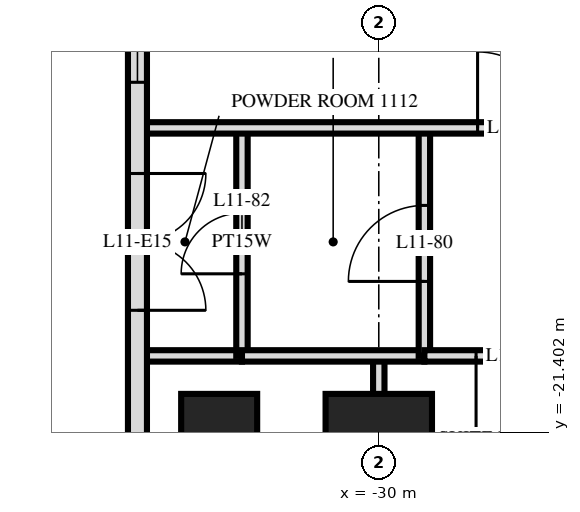
"""IFC4 building model, lengths in metres.
Left out: names, types, materials, properties, quantities, classifications, styles, units other than length and angle.
Written with IfcOpenShell. Run it as: python <this file> out.ifc"""

import sys

from ifc_helpers import new_model, si_unit, direction, frame, frame_2d, origin, origin_2d, place, context, subcontext, project, spatial, rectangle, extrude, element, fill, save


model = new_model("IFC4")
c1 = context("Model", 3, precision=1e-05, world=origin(), true_north=direction((0.0, 1.0)))
c2 = subcontext(c1, "Body", "Model", "MODEL_VIEW")
j1 = project(units=[si_unit("LENGTHUNIT", "METRE"), si_unit("PLANEANGLEUNIT", "RADIAN")], contexts=[c1])
p1 = place(None, origin())
s1 = spatial("IfcSite", under=j1, at=p1, CompositionType="ELEMENT")
p2 = place(p1, origin())
s2 = spatial("IfcBuilding", under=s1, at=p2, CompositionType="ELEMENT")
p3 = place(p2, frame((0.0, 0.0, 49.2)))
s3 = spatial("IfcBuildingStorey", under=s2, at=p3, CompositionType="ELEMENT", Elevation=49.2)
p4 = place(p3, frame((-32.1, -21.6, 0.0), z_axis=(0.0, 0.0, 1.0), x_axis=(0.0, 1.0, 0.0)))
e1 = element("IfcColumn", 1, at=p4, inside=s3, PredefinedType="COLUMN", context=c2, shape_type="SweptSolid", body=[
    extrude(rectangle(XDim=1.4, YDim=1.0, at=origin_2d()), origin(), (0.0, 0.0, 1.0), 3.6),
])
p5 = place(p3, frame((-30.0, -21.6, 0.0), z_axis=(0.0, 0.0, 1.0), x_axis=(1.0, 0.0, 0.0)))
e2 = element("IfcColumn", 2, at=p5, inside=s3, PredefinedType="COLUMN", context=c2, shape_type="SweptSolid", body=[
    extrude(rectangle(XDim=1.4, YDim=1.4, at=origin_2d()), origin(), (0.0, 0.0, 1.0), 3.6),
])
p6 = place(p3, frame((-33.175, -3.325, 0.0), z_axis=(0.0, 0.0, 1.0), x_axis=(0.0, -1.0, 0.0)))
e3 = element("IfcWall", 3, at=p6, inside=s3, PredefinedType="SOLIDWALL", context=c2, shape_type="SweptSolid", body=[
    extrude(rectangle(XDim=21.551, YDim=0.25, at=frame_2d((10.775, 0.0))), origin(), (0.0, 0.0, 1.0), 3.32),
])
p7 = place(p6, frame((6.65, 0.0, 0.0)))
e4 = element("IfcOpeningElement", 4, at=p7, cuts=e3, PredefinedType="OPENING", context=c2, shape_type="SweptSolid", body=[
    extrude(rectangle(XDim=1.8, YDim=2.4, at=frame_2d((0.9, 1.2))), frame((0.0, 0.135, 0.0), z_axis=(0.0, -1.0, 0.0), x_axis=(1.0, 0.0, 0.0)), (0.0, 0.0, 1.0), 0.27),
])
p8 = place(p6, frame((12.275, 0.0, 0.3)))
e5 = element("IfcOpeningElement", 5, at=p8, cuts=e3, PredefinedType="OPENING", context=c2, shape_type="SweptSolid", body=[
    extrude(rectangle(XDim=1.2, YDim=2.1, at=frame_2d((0.6, 1.05))), frame((0.0, 0.135, 0.0), z_axis=(0.0, -1.0, 0.0), x_axis=(1.0, 0.0, 0.0)), (0.0, 0.0, 1.0), 0.27),
])
p9 = place(p6, frame((14.675, 0.0, 0.0)))
e6 = element("IfcOpeningElement", 6, at=p9, cuts=e3, PredefinedType="OPENING", context=c2, shape_type="SweptSolid", body=[
    extrude(rectangle(XDim=1.8, YDim=2.4, at=frame_2d((0.9, 1.2))), frame((0.0, 0.135, 0.0), z_axis=(0.0, -1.0, 0.0), x_axis=(1.0, 0.0, 0.0)), (0.0, 0.0, 1.0), 0.27),
])
p10 = place(p6, frame((18.875, 0.0, 0.0)))
e7 = element("IfcOpeningElement", 7, at=p10, cuts=e3, PredefinedType="OPENING", context=c2, shape_type="SweptSolid", body=[
    extrude(rectangle(XDim=1.8, YDim=2.4, at=frame_2d((0.9, 1.2))), frame((0.0, 0.135, 0.0), z_axis=(0.0, -1.0, 0.0), x_axis=(1.0, 0.0, 0.0)), (0.0, 0.0, 1.0), 0.27),
])
p11 = place(p3, frame((-29.4, -20.4, 0.0), z_axis=(0.0, 0.0, 1.0), x_axis=(0.0, 1.0, 0.0)))
e8 = element("IfcWall", 8, at=p11, inside=s3, PredefinedType="PARTITIONING", context=c2, shape_type="SweptSolid", body=[
    extrude(rectangle(XDim=3.0, YDim=0.15, at=frame_2d((1.5, 0.0))), origin(), (0.0, 0.0, 1.0), 3.32),
])
p12 = place(p11, frame((0.98, 0.0, 0.0)))
e9 = element("IfcOpeningElement", 9, at=p12, cuts=e8, PredefinedType="OPENING", context=c2, shape_type="SweptSolid", body=[
    extrude(rectangle(XDim=1.0, YDim=2.1, at=frame_2d((0.5, 1.05))), frame((0.0, 0.085, 0.0), z_axis=(0.0, -1.0, 0.0), x_axis=(1.0, 0.0, 0.0)), (0.0, 0.0, 1.0), 0.17),
])
p13 = place(p3, frame((-30.0, -28.978, 0.0), z_axis=(0.0, 0.0, 1.0), x_axis=(0.0, 1.0, 0.0)))
e10 = element("IfcWall", 10, at=p13, inside=s3, PredefinedType="PARTITIONING", context=c2, shape_type="SweptSolid", body=[
    extrude(rectangle(XDim=8.578, YDim=0.15, at=frame_2d((4.289, 0.0))), origin(), (0.0, 0.0, 1.0), 3.32),
])
p14 = place(p13, frame((3.737, 0.0, 0.0)))
e11 = element("IfcOpeningElement", 11, at=p14, cuts=e10, PredefinedType="OPENING", context=c2, shape_type="SweptSolid", body=[
    extrude(rectangle(XDim=0.9, YDim=2.1, at=frame_2d((0.45, 1.05))), frame((0.0, 0.085, 0.0), z_axis=(0.0, -1.0, 0.0), x_axis=(1.0, 0.0, 0.0)), (0.0, 0.0, 1.0), 0.17),
])
p15 = place(p3, frame((-31.8, -20.4, 0.0), z_axis=(0.0, 0.0, 1.0), x_axis=(0.0, 1.0, 0.0)))
e12 = element("IfcWall", 12, at=p15, inside=s3, PredefinedType="PLUMBINGWALL", context=c2, shape_type="SweptSolid", body=[
    extrude(rectangle(XDim=3.0, YDim=0.15, at=frame_2d((1.5, 0.0))), origin(), (0.0, 0.0, 1.0), 3.32),
])
p16 = place(p15, frame((1.08, 0.0, 0.0)))
e13 = element("IfcOpeningElement", 13, at=p16, cuts=e12, PredefinedType="OPENING", context=c2, shape_type="SweptSolid", body=[
    extrude(rectangle(XDim=0.8, YDim=2.1, at=frame_2d((0.4, 1.05))), frame((0.0, 0.085, 0.0), z_axis=(0.0, -1.0, 0.0), x_axis=(1.0, 0.0, 0.0)), (0.0, 0.0, 1.0), 0.17),
])
p17 = place(p3, frame((-29.4, -20.4, 0.0), z_axis=(0.0, 0.0, 1.0), x_axis=(1.0, 0.0, 0.0)))
e14 = element("IfcWall", 14, at=p17, inside=s3, PredefinedType="PARTITIONING", context=c2, shape_type="SweptSolid", body=[
    extrude(rectangle(XDim=2.4, YDim=0.15, at=frame_2d((1.2, 0.0))), origin(), (0.0, 0.0, 1.0), 3.32),
])
p18 = place(p17, frame((0.68, 0.0, 0.0)))
e15 = element("IfcOpeningElement", 15, at=p18, cuts=e14, PredefinedType="OPENING", context=c2, shape_type="SweptSolid", body=[
    extrude(rectangle(XDim=1.0, YDim=2.1, at=frame_2d((0.5, 1.05))), frame((0.0, 0.085, 0.0), z_axis=(0.0, -1.0, 0.0), x_axis=(1.0, 0.0, 0.0)), (0.0, 0.0, 1.0), 0.17),
])
p19 = place(p3, frame((-31.8, -20.4, 0.0), z_axis=(0.0, 0.0, 1.0), x_axis=(1.0, 0.0, 0.0)))
e16 = element("IfcWall", 16, at=p19, inside=s3, PredefinedType="PARTITIONING", context=c2, shape_type="SweptSolid", body=[
    extrude(rectangle(XDim=2.4, YDim=0.15, at=frame_2d((1.2, 0.0))), origin(), (0.0, 0.0, 1.0), 3.32),
])
p20 = place(p3, frame((-33.12, -20.4, 0.0), z_axis=(0.0, 0.0, 1.0), x_axis=(1.0, 0.0, 0.0)))
e17 = element("IfcWall", 17, at=p20, inside=s3, PredefinedType="PLUMBINGWALL", context=c2, shape_type="SweptSolid", body=[
    extrude(rectangle(XDim=1.32, YDim=0.15, at=frame_2d((0.66, 0.0))), origin(), (0.0, 0.0, 1.0), 3.32),
])
p21 = place(p3, frame((-33.12, -17.4, 0.0), z_axis=(0.0, 0.0, 1.0), x_axis=(1.0, 0.0, 0.0)))
e18 = element("IfcWall", 18, at=p21, inside=s3, PredefinedType="PARTITIONING", context=c2, shape_type="SweptSolid", body=[
    extrude(rectangle(XDim=66.24, YDim=0.15, at=frame_2d((33.12, 0.0))), origin(), (0.0, 0.0, 1.0), 3.32),
])
p22 = place(p21, frame((9.27, 0.0, 0.0)))
e19 = element("IfcOpeningElement", 19, at=p22, cuts=e18, PredefinedType="OPENING", context=c2, shape_type="SweptSolid", body=[
    extrude(rectangle(XDim=1.0, YDim=2.1, at=frame_2d((0.5, 1.05))), frame((0.0, 0.085, 0.0), z_axis=(0.0, -1.0, 0.0), x_axis=(1.0, 0.0, 0.0)), (0.0, 0.0, 1.0), 0.17),
])
p23 = place(p21, frame((13.97, 0.0, 0.0)))
e20 = element("IfcOpeningElement", 20, at=p23, cuts=e18, PredefinedType="OPENING", context=c2, shape_type="SweptSolid", body=[
    extrude(rectangle(XDim=1.0, YDim=2.1, at=frame_2d((0.5, 1.05))), frame((0.0, 0.085, 0.0), z_axis=(0.0, -1.0, 0.0), x_axis=(1.0, 0.0, 0.0)), (0.0, 0.0, 1.0), 0.17),
])
p24 = place(p21, frame((15.27, 0.0, 0.0)))
e21 = element("IfcOpeningElement", 21, at=p24, cuts=e18, PredefinedType="OPENING", context=c2, shape_type="SweptSolid", body=[
    extrude(rectangle(XDim=1.0, YDim=2.1, at=frame_2d((0.5, 1.05))), frame((0.0, 0.085, 0.0), z_axis=(0.0, -1.0, 0.0), x_axis=(1.0, 0.0, 0.0)), (0.0, 0.0, 1.0), 0.17),
])
p25 = place(p21, frame((19.97, 0.0, 0.0)))
e22 = element("IfcOpeningElement", 22, at=p25, cuts=e18, PredefinedType="OPENING", context=c2, shape_type="SweptSolid", body=[
    extrude(rectangle(XDim=1.0, YDim=2.1, at=frame_2d((0.5, 1.05))), frame((0.0, 0.085, 0.0), z_axis=(0.0, -1.0, 0.0), x_axis=(1.0, 0.0, 0.0)), (0.0, 0.0, 1.0), 0.17),
])
p26 = place(p21, frame((22.27, 0.0, 0.0)))
e23 = element("IfcOpeningElement", 23, at=p26, cuts=e18, PredefinedType="OPENING", context=c2, shape_type="SweptSolid", body=[
    extrude(rectangle(XDim=1.0, YDim=2.1, at=frame_2d((0.5, 1.05))), frame((0.0, 0.085, 0.0), z_axis=(0.0, -1.0, 0.0), x_axis=(1.0, 0.0, 0.0)), (0.0, 0.0, 1.0), 0.17),
])
p27 = place(p21, frame((28.97, 0.0, 0.0)))
e24 = element("IfcOpeningElement", 24, at=p27, cuts=e18, PredefinedType="OPENING", context=c2, shape_type="SweptSolid", body=[
    extrude(rectangle(XDim=1.0, YDim=2.1, at=frame_2d((0.5, 1.05))), frame((0.0, 0.085, 0.0), z_axis=(0.0, -1.0, 0.0), x_axis=(1.0, 0.0, 0.0)), (0.0, 0.0, 1.0), 0.17),
])
p28 = place(p21, frame((30.27, 0.0, 0.0)))
e25 = element("IfcOpeningElement", 25, at=p28, cuts=e18, PredefinedType="OPENING", context=c2, shape_type="SweptSolid", body=[
    extrude(rectangle(XDim=1.0, YDim=2.1, at=frame_2d((0.5, 1.05))), frame((0.0, 0.085, 0.0), z_axis=(0.0, -1.0, 0.0), x_axis=(1.0, 0.0, 0.0)), (0.0, 0.0, 1.0), 0.17),
])
p29 = place(p21, frame((34.97, 0.0, 0.0)))
e26 = element("IfcOpeningElement", 26, at=p29, cuts=e18, PredefinedType="OPENING", context=c2, shape_type="SweptSolid", body=[
    extrude(rectangle(XDim=1.0, YDim=2.1, at=frame_2d((0.5, 1.05))), frame((0.0, 0.085, 0.0), z_axis=(0.0, -1.0, 0.0), x_axis=(1.0, 0.0, 0.0)), (0.0, 0.0, 1.0), 0.17),
])
p30 = place(p21, frame((36.27, 0.0, 0.0)))
e27 = element("IfcOpeningElement", 27, at=p30, cuts=e18, PredefinedType="OPENING", context=c2, shape_type="SweptSolid", body=[
    extrude(rectangle(XDim=1.0, YDim=2.1, at=frame_2d((0.5, 1.05))), frame((0.0, 0.085, 0.0), z_axis=(0.0, -1.0, 0.0), x_axis=(1.0, 0.0, 0.0)), (0.0, 0.0, 1.0), 0.17),
])
p31 = place(p21, frame((39.82, 0.0, 0.0)))
e28 = element("IfcOpeningElement", 28, at=p31, cuts=e18, PredefinedType="OPENING", context=c2, shape_type="SweptSolid", body=[
    extrude(rectangle(XDim=1.0, YDim=2.1, at=frame_2d((0.5, 1.05))), frame((0.0, 0.085, 0.0), z_axis=(0.0, -1.0, 0.0), x_axis=(1.0, 0.0, 0.0)), (0.0, 0.0, 1.0), 0.17),
])
p32 = place(p21, frame((51.27, 0.0, 0.0)))
e29 = element("IfcOpeningElement", 29, at=p32, cuts=e18, PredefinedType="OPENING", context=c2, shape_type="SweptSolid", body=[
    extrude(rectangle(XDim=1.0, YDim=2.1, at=frame_2d((0.5, 1.05))), frame((0.0, 0.085, 0.0), z_axis=(0.0, -1.0, 0.0), x_axis=(1.0, 0.0, 0.0)), (0.0, 0.0, 1.0), 0.17),
])
p33 = place(p21, frame((4.42, 0.0, 0.0)))
e30 = element("IfcOpeningElement", 30, at=p33, cuts=e18, PredefinedType="OPENING", context=c2, shape_type="SweptSolid", body=[
    extrude(rectangle(XDim=1.0, YDim=2.1, at=frame_2d((0.5, 1.05))), frame((0.0, 0.085, 0.0), z_axis=(0.0, -1.0, 0.0), x_axis=(1.0, 0.0, 0.0)), (0.0, 0.0, 1.0), 0.17),
])
p34 = place(p21, frame((54.82, 0.0, 0.0)))
e31 = element("IfcOpeningElement", 31, at=p34, cuts=e18, PredefinedType="OPENING", context=c2, shape_type="SweptSolid", body=[
    extrude(rectangle(XDim=1.0, YDim=2.1, at=frame_2d((0.5, 1.05))), frame((0.0, 0.085, 0.0), z_axis=(0.0, -1.0, 0.0), x_axis=(1.0, 0.0, 0.0)), (0.0, 0.0, 1.0), 0.17),
])
p35 = place(p8, origin())
e32 = element("IfcWindow", 32, at=p35, inside=s3, PartitioningType="SINGLE_PANEL", PredefinedType="WINDOW", context=c2, shape_type="SweptSolid", body=[
    extrude(rectangle(XDim=1.2, YDim=2.1, at=frame_2d((0.6, 1.05))), frame((0.0, 0.03, 0.0), z_axis=(0.0, -1.0, 0.0), x_axis=(1.0, 0.0, 0.0)), (0.0, 0.0, 1.0), 0.06),
])
fill(e5, e32)
p36 = place(p9, origin())
e33 = element("IfcDoor", 33, at=p36, inside=s3, OperationType="DOUBLE_DOOR_SINGLE_SWING", PredefinedType="DOOR", context=c2, shape_type="SweptSolid", body=[
    extrude(rectangle(XDim=1.8, YDim=2.4, at=frame_2d((0.9, 1.2))), frame((0.0, 0.025, 0.0), z_axis=(0.0, -1.0, 0.0), x_axis=(1.0, 0.0, 0.0)), (0.0, 0.0, 1.0), 0.05),
])
fill(e6, e33)
p37 = place(p33, origin())
e34 = element("IfcDoor", 34, at=p37, inside=s3, OperationType="SINGLE_SWING_RIGHT", PredefinedType="DOOR", context=c2, shape_type="SweptSolid", body=[
    extrude(rectangle(XDim=1.0, YDim=2.1, at=frame_2d((0.5, 1.05))), frame((0.0, 0.025, 0.0), z_axis=(0.0, -1.0, 0.0), x_axis=(1.0, 0.0, 0.0)), (0.0, 0.0, 1.0), 0.05),
])
fill(e30, e34)
p38 = place(p12, origin())
e35 = element("IfcDoor", 35, at=p38, inside=s3, OperationType="SINGLE_SWING_RIGHT", PredefinedType="DOOR", context=c2, shape_type="SweptSolid", body=[
    extrude(rectangle(XDim=1.0, YDim=2.1, at=frame_2d((0.5, 1.05))), frame((0.0, 0.025, 0.0), z_axis=(0.0, -1.0, 0.0), x_axis=(1.0, 0.0, 0.0)), (0.0, 0.0, 1.0), 0.05),
])
fill(e9, e35)
p39 = place(p18, frame((0.5, 0.0, 0.0), z_axis=(0.0, 0.0, 1.0), x_axis=(-1.0, 0.0, 0.0)))
e36 = element("IfcDoor", 36, at=p39, inside=s3, OperationType="SINGLE_SWING_LEFT", PredefinedType="DOOR", context=c2, shape_type="SweptSolid", body=[
    extrude(rectangle(XDim=1.0, YDim=2.1, at=frame_2d((0.0, 1.05))), frame((0.0, -0.025, 0.0), z_axis=(0.0, 1.0, 0.0), x_axis=(-1.0, 0.0, 0.0)), (0.0, 0.0, 1.0), 0.05),
])
fill(e15, e36)
p40 = place(p16, origin())
e37 = element("IfcDoor", 37, at=p40, inside=s3, OperationType="SINGLE_SWING_RIGHT", PredefinedType="DOOR", context=c2, shape_type="SweptSolid", body=[
    extrude(rectangle(XDim=0.8, YDim=2.1, at=frame_2d((0.4, 1.05))), frame((0.0, 0.025, 0.0), z_axis=(0.0, -1.0, 0.0), x_axis=(1.0, 0.0, 0.0)), (0.0, 0.0, 1.0), 0.05),
])
fill(e13, e37)
save(model, sys.argv[1])
